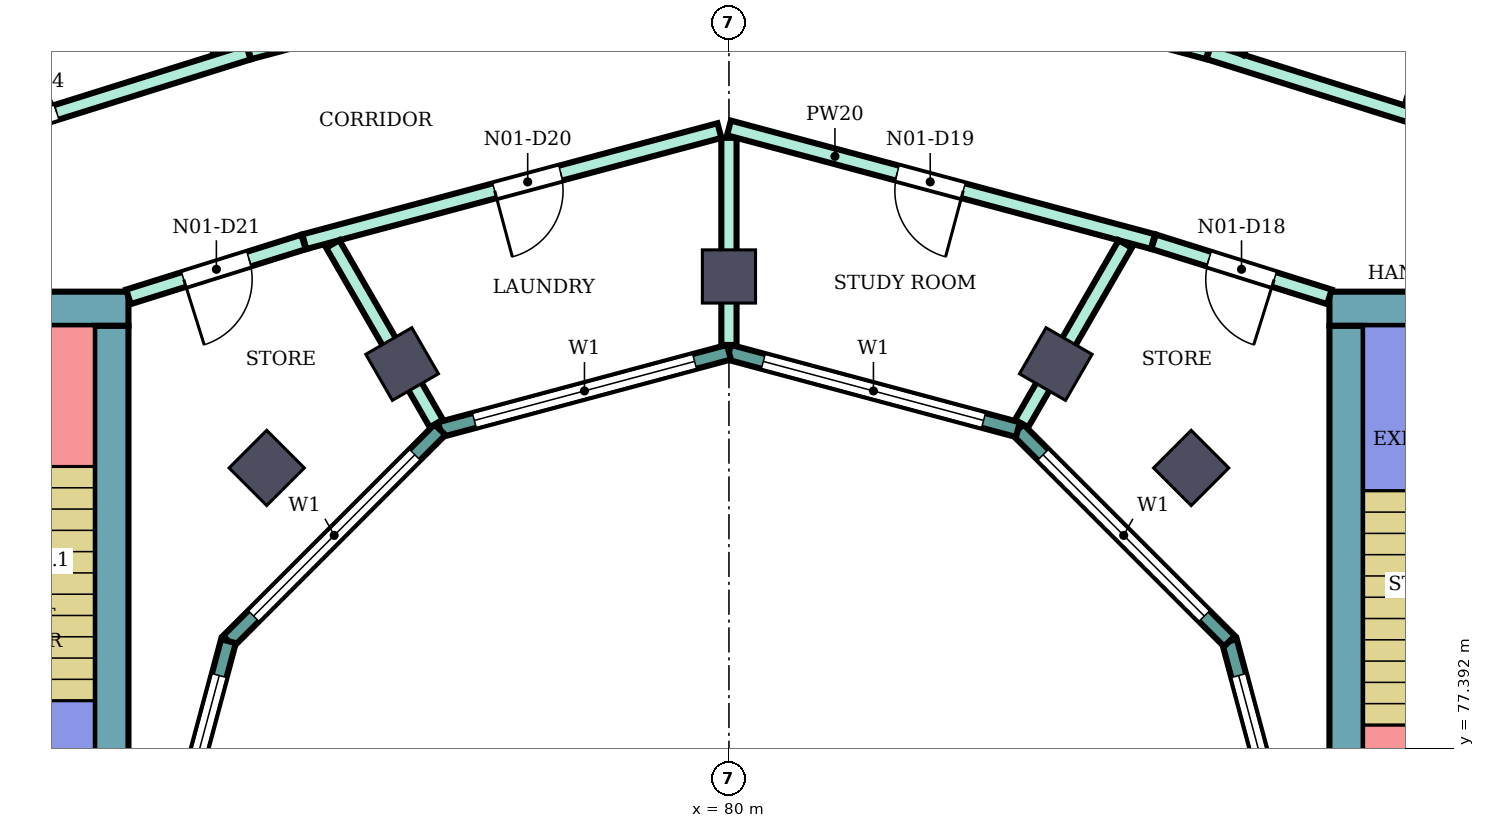
"""IFC4 building model, lengths in metres.
Left out: names, types, materials, properties, quantities, classifications, styles, units other than length and angle.
Written with IfcOpenShell. Run it as: python <this file> out.ifc"""

import sys

from ifc_helpers import new_model, si_unit, direction, frame, frame_2d, origin, origin_2d, place, context, subcontext, project, spatial, rectangle, extrude, element, fill, save


model = new_model("IFC4")
c1 = context("Model", 3, precision=1e-05, world=origin(), true_north=direction((0.0, 1.0)))
c2 = subcontext(c1, "Body", "Model", "MODEL_VIEW")
j1 = project(units=[si_unit("LENGTHUNIT", "METRE"), si_unit("PLANEANGLEUNIT", "RADIAN")], contexts=[c1])
p1 = place(None, origin())
s1 = spatial("IfcSite", under=j1, at=p1, CompositionType="ELEMENT")
p2 = place(p1, origin())
s2 = spatial("IfcBuilding", under=s1, at=p2, CompositionType="ELEMENT")
p3 = place(p2, frame((0.0, 0.0, 275.7)))
s3 = spatial("IfcBuildingStorey", under=s2, at=p3, CompositionType="ELEMENT", Elevation=275.7)
for number, where, z_axis, x_axis in (
    (1, (86.081, 81.081, 0.0), (0.0, 0.0, 1.0), (0.707, 0.707, 0.0)),
    (2, (84.3, 82.448, 0.0), (0.0, 0.0, 1.0), (0.5, 0.866, 0.0)),
    (3, (80.0, 83.6, 0.0), (0.0, 0.0, 1.0), (0.0, 1.0, 0.0)),
    (4, (75.7, 82.448, 0.0), (0.0, 0.0, 1.0), (-0.5, 0.866, 0.0)),
    (5, (73.919, 81.081, 0.0), (0.0, 0.0, 1.0), (-0.707, 0.707, 0.0)),
):
    element("IfcColumn", number, at=place(p3, frame(where, z_axis=z_axis, x_axis=x_axis)), inside=s3, PredefinedType="COLUMN", context=c2, shape_type="SweptSolid", body=[
        extrude(rectangle(XDim=0.7, YDim=0.7, at=origin_2d()), origin(), (0.0, 0.0, 1.0), 4.2),
    ])
p4 = place(p3, frame((87.9, 83.175, 0.0), z_axis=(0.0, 0.0, 1.0), x_axis=(1.0, 0.0, 0.0)))
e6 = element("IfcWall", 6, at=p4, inside=s3, PredefinedType="SHEAR", context=c2, shape_type="SweptSolid", body=[
    extrude(rectangle(XDim=13.55, YDim=0.45, at=frame_2d((6.775, 0.0))), origin(), (0.0, 0.0, 1.0), 3.88),
])
p5 = place(p4, frame((4.2, 0.0, 0.0)))
e7 = element("IfcOpeningElement", 7, at=p5, cuts=e6, PredefinedType="OPENING", context=c2, shape_type="SweptSolid", body=[
    extrude(rectangle(XDim=2.4, YDim=2.4, at=frame_2d((1.2, 1.2))), frame((0.0, 0.235, 0.0), z_axis=(0.0, -1.0, 0.0), x_axis=(1.0, 0.0, 0.0)), (0.0, 0.0, 1.0), 0.47),
])
p6 = place(p3, frame((88.125, 75.0, 0.0), z_axis=(0.0, 0.0, 1.0), x_axis=(0.0, 1.0, 0.0)))
e8 = element("IfcWall", 8, at=p6, inside=s3, PredefinedType="SHEAR", context=c2, shape_type="SweptSolid", body=[
    extrude(rectangle(XDim=7.95, YDim=0.45, at=frame_2d((3.975, 0.0))), origin(), (0.0, 0.0, 1.0), 3.88),
])
p7 = place(p3, frame((72.1, 83.175, 0.0), z_axis=(0.0, 0.0, 1.0), x_axis=(-1.0, 0.0, 0.0)))
e9 = element("IfcWall", 9, at=p7, inside=s3, PredefinedType="SHEAR", context=c2, shape_type="SweptSolid", body=[
    extrude(rectangle(XDim=13.55, YDim=0.45, at=frame_2d((6.775, 0.0))), origin(), (0.0, 0.0, 1.0), 3.88),
])
p8 = place(p7, frame((4.2, 0.0, 0.0)))
e10 = element("IfcOpeningElement", 10, at=p8, cuts=e9, PredefinedType="OPENING", context=c2, shape_type="SweptSolid", body=[
    extrude(rectangle(XDim=2.4, YDim=2.4, at=frame_2d((1.2, 1.2))), frame((0.0, 0.235, 0.0), z_axis=(0.0, -1.0, 0.0), x_axis=(1.0, 0.0, 0.0)), (0.0, 0.0, 1.0), 0.47),
])
p9 = place(p3, frame((71.875, 82.95, 0.0), z_axis=(0.0, 0.0, 1.0), x_axis=(0.0, -1.0, 0.0)))
e11 = element("IfcWall", 11, at=p9, inside=s3, PredefinedType="SHEAR", context=c2, shape_type="SweptSolid", body=[
    extrude(rectangle(XDim=7.95, YDim=0.45, at=frame_2d((3.975, 0.0))), origin(), (0.0, 0.0, 1.0), 3.88),
])
p10 = place(p3, frame((87.604, 75.0, 0.0), z_axis=(0.0, 0.0, 1.0), x_axis=(-0.258789828301, 0.965933654434, 0.0)))
e12 = element("IfcWall", 12, at=p10, inside=s3, PredefinedType="NOTDEFINED", context=c2, shape_type="SweptSolid", body=[
    extrude(rectangle(XDim=3.936, YDim=0.2, at=frame_2d((1.968, 0.0))), origin(), (0.0, 0.0, 1.0), 4.2),
])
p11 = place(p10, frame((0.468, 0.0, 0.9)))
e13 = element("IfcOpeningElement", 13, at=p11, cuts=e12, PredefinedType="OPENING", context=c2, shape_type="SweptSolid", body=[
    extrude(rectangle(XDim=3.0, YDim=2.3, at=frame_2d((1.5, 1.15))), frame((0.0, 0.11, 0.0), z_axis=(0.0, -1.0, 0.0), x_axis=(1.0, 0.0, 0.0)), (0.0, 0.0, 1.0), 0.22),
])
p12 = place(p3, frame((86.585, 78.802, 0.0), z_axis=(0.0, 0.0, 1.0), x_axis=(-0.707106781187, 0.707106781187, 0.0)))
e14 = element("IfcWall", 14, at=p12, inside=s3, PredefinedType="NOTDEFINED", context=c2, shape_type="SweptSolid", body=[
    extrude(rectangle(XDim=3.936, YDim=0.2, at=frame_2d((1.968, 0.0))), origin(), (0.0, 0.0, 1.0), 4.2),
])
p13 = place(p12, frame((0.468, 0.0, 0.9)))
e15 = element("IfcOpeningElement", 15, at=p13, cuts=e14, PredefinedType="OPENING", context=c2, shape_type="SweptSolid", body=[
    extrude(rectangle(XDim=3.0, YDim=2.3, at=frame_2d((1.5, 1.15))), frame((0.0, 0.11, 0.0), z_axis=(0.0, -1.0, 0.0), x_axis=(1.0, 0.0, 0.0)), (0.0, 0.0, 1.0), 0.22),
])
p14 = place(p3, frame((83.802, 81.585, 0.0), z_axis=(0.0, 0.0, 1.0), x_axis=(-0.965933654434, 0.258789828301, 0.0)))
e16 = element("IfcWall", 16, at=p14, inside=s3, PredefinedType="NOTDEFINED", context=c2, shape_type="SweptSolid", body=[
    extrude(rectangle(XDim=3.936, YDim=0.2, at=frame_2d((1.968, 0.0))), origin(), (0.0, 0.0, 1.0), 4.2),
])
p15 = place(p14, frame((0.468, 0.0, 0.9)))
e17 = element("IfcOpeningElement", 17, at=p15, cuts=e16, PredefinedType="OPENING", context=c2, shape_type="SweptSolid", body=[
    extrude(rectangle(XDim=3.0, YDim=2.3, at=frame_2d((1.5, 1.15))), frame((0.0, 0.11, 0.0), z_axis=(0.0, -1.0, 0.0), x_axis=(1.0, 0.0, 0.0)), (0.0, 0.0, 1.0), 0.22),
])
p16 = place(p3, frame((80.0, 82.604, 0.0), z_axis=(0.0, 0.0, 1.0), x_axis=(-0.965933654434, -0.258789828301, 0.0)))
e18 = element("IfcWall", 18, at=p16, inside=s3, PredefinedType="NOTDEFINED", context=c2, shape_type="SweptSolid", body=[
    extrude(rectangle(XDim=3.936, YDim=0.2, at=frame_2d((1.968, 0.0))), origin(), (0.0, 0.0, 1.0), 4.2),
])
p17 = place(p16, frame((0.468, 0.0, 0.9)))
e19 = element("IfcOpeningElement", 19, at=p17, cuts=e18, PredefinedType="OPENING", context=c2, shape_type="SweptSolid", body=[
    extrude(rectangle(XDim=3.0, YDim=2.3, at=frame_2d((1.5, 1.15))), frame((0.0, 0.11, 0.0), z_axis=(0.0, -1.0, 0.0), x_axis=(1.0, 0.0, 0.0)), (0.0, 0.0, 1.0), 0.22),
])
p18 = place(p3, frame((76.198, 81.585, 0.0), z_axis=(0.0, 0.0, 1.0), x_axis=(-0.707106781187, -0.707106781187, 0.0)))
e20 = element("IfcWall", 20, at=p18, inside=s3, PredefinedType="NOTDEFINED", context=c2, shape_type="SweptSolid", body=[
    extrude(rectangle(XDim=3.936, YDim=0.2, at=frame_2d((1.968, 0.0))), origin(), (0.0, 0.0, 1.0), 4.2),
])
p19 = place(p18, frame((0.468, 0.0, 0.9)))
e21 = element("IfcOpeningElement", 21, at=p19, cuts=e20, PredefinedType="OPENING", context=c2, shape_type="SweptSolid", body=[
    extrude(rectangle(XDim=3.0, YDim=2.3, at=frame_2d((1.5, 1.15))), frame((0.0, 0.11, 0.0), z_axis=(0.0, -1.0, 0.0), x_axis=(1.0, 0.0, 0.0)), (0.0, 0.0, 1.0), 0.22),
])
p20 = place(p3, frame((73.415, 78.802, 0.0), z_axis=(0.0, 0.0, 1.0), x_axis=(-0.258789828301, -0.965933654434, 0.0)))
e22 = element("IfcWall", 22, at=p20, inside=s3, PredefinedType="NOTDEFINED", context=c2, shape_type="SweptSolid", body=[
    extrude(rectangle(XDim=3.936, YDim=0.2, at=frame_2d((1.968, 0.0))), origin(), (0.0, 0.0, 1.0), 4.2),
])
p21 = place(p20, frame((0.468, 0.0, 0.9)))
e23 = element("IfcOpeningElement", 23, at=p21, cuts=e22, PredefinedType="OPENING", context=c2, shape_type="SweptSolid", body=[
    extrude(rectangle(XDim=3.0, YDim=2.3, at=frame_2d((1.5, 1.15))), frame((0.0, 0.11, 0.0), z_axis=(0.0, -1.0, 0.0), x_axis=(1.0, 0.0, 0.0)), (0.0, 0.0, 1.0), 0.22),
])
p22 = place(p3, frame((67.852, 96.042, 0.0), z_axis=(0.0, 0.0, 1.0), x_axis=(0.499960582802, -0.866048160118, 0.0)))
e24 = element("IfcWall", 24, at=p22, inside=s3, PredefinedType="PARTITIONING", context=c2, shape_type="SweptSolid", body=[
    extrude(rectangle(XDim=10.946, YDim=0.2, at=frame_2d((5.473, 0.0))), origin(), (0.0, 0.0, 1.0), 3.75),
])
p23 = place(p3, frame((68.2, 84.833, 0.0), z_axis=(0.0, 0.0, 1.0), x_axis=(0.954191968402, 0.299195065863, 0.0)))
e25 = element("IfcWall", 25, at=p23, inside=s3, PredefinedType="PARTITIONING", context=c2, shape_type="SweptSolid", body=[
    extrude(rectangle(XDim=5.74, YDim=0.2, at=frame_2d((2.87, 0.0))), origin(), (0.0, 0.0, 1.0), 3.75),
])
p24 = place(p23, frame((2.097, 0.0, 0.0)))
e26 = element("IfcOpeningElement", 26, at=p24, cuts=e25, PredefinedType="OPENING", context=c2, shape_type="SweptSolid", body=[
    extrude(rectangle(XDim=1.0, YDim=2.1, at=frame_2d((0.5, 1.05))), frame((0.0, 0.11, 0.0), z_axis=(0.0, -1.0, 0.0), x_axis=(1.0, 0.0, 0.0)), (0.0, 0.0, 1.0), 0.22),
])
p25 = place(p3, frame((72.1, 83.332, 0.0), z_axis=(0.0, 0.0, 1.0), x_axis=(0.954233106619, 0.299063836383, 0.0)))
e27 = element("IfcWall", 27, at=p25, inside=s3, PredefinedType="PARTITIONING", context=c2, shape_type="SweptSolid", body=[
    extrude(rectangle(XDim=2.414, YDim=0.2, at=frame_2d((1.207, 0.0))), origin(), (0.0, 0.0, 1.0), 3.75),
])
p26 = place(p25, frame((0.762, 0.0, 0.0)))
e28 = element("IfcOpeningElement", 28, at=p26, cuts=e27, PredefinedType="OPENING", context=c2, shape_type="SweptSolid", body=[
    extrude(rectangle(XDim=0.9, YDim=2.1, at=frame_2d((0.45, 1.05))), frame((0.0, 0.11, 0.0), z_axis=(0.0, -1.0, 0.0), x_axis=(1.0, 0.0, 0.0)), (0.0, 0.0, 1.0), 0.22),
])
p27 = place(p3, frame((73.687, 86.554, 0.0), z_axis=(0.0, 0.0, 1.0), x_axis=(0.966002126521, 0.258534120682, 0.0)))
e29 = element("IfcWall", 29, at=p27, inside=s3, PredefinedType="PARTITIONING", context=c2, shape_type="SweptSolid", body=[
    extrude(rectangle(XDim=6.486, YDim=0.2, at=frame_2d((3.243, 0.0))), origin(), (0.0, 0.0, 1.0), 3.75),
])
p28 = place(p3, frame((74.413, 84.057, 0.0), z_axis=(0.0, 0.0, 1.0), x_axis=(0.965972135939, 0.258646153246, 0.0)))
e30 = element("IfcWall", 30, at=p28, inside=s3, PredefinedType="PARTITIONING", context=c2, shape_type="SweptSolid", body=[
    extrude(rectangle(XDim=5.654, YDim=0.2, at=frame_2d((2.827, 0.0))), origin(), (0.0, 0.0, 1.0), 3.75),
])
p29 = place(p28, frame((2.593, 0.0, 0.0)))
e31 = element("IfcOpeningElement", 31, at=p29, cuts=e30, PredefinedType="OPENING", context=c2, shape_type="SweptSolid", body=[
    extrude(rectangle(XDim=0.9, YDim=2.1, at=frame_2d((0.45, 1.05))), frame((0.0, 0.11, 0.0), z_axis=(0.0, -1.0, 0.0), x_axis=(1.0, 0.0, 0.0)), (0.0, 0.0, 1.0), 0.22),
])
p30 = place(p3, frame((74.788, 84.027, 0.0), z_axis=(0.0, 0.0, 1.0), x_axis=(0.49997314572, -0.866040907555, 0.0)))
e32 = element("IfcWall", 32, at=p30, inside=s3, PredefinedType="PARTITIONING", context=c2, shape_type="SweptSolid", body=[
    extrude(rectangle(XDim=2.726, YDim=0.2, at=frame_2d((1.363, 0.0))), origin(), (0.0, 0.0, 1.0), 3.75),
])
p31 = place(p3, frame((80.0, 82.699, 0.0), z_axis=(0.0, 0.0, 1.0), x_axis=(0.0, 1.0, 0.0)))
e33 = element("IfcWall", 33, at=p31, inside=s3, PredefinedType="PARTITIONING", context=c2, shape_type="SweptSolid", body=[
    extrude(rectangle(XDim=2.725, YDim=0.2, at=frame_2d((1.363, 0.0))), origin(), (0.0, 0.0, 1.0), 3.75),
])
p32 = place(p3, frame((80.0, 85.554, 0.0), z_axis=(0.0, 0.0, 1.0), x_axis=(0.965928989968, -0.258807237802, 0.0)))
e34 = element("IfcWall", 34, at=p32, inside=s3, PredefinedType="PARTITIONING", context=c2, shape_type="SweptSolid", body=[
    extrude(rectangle(XDim=5.774, YDim=0.2, at=frame_2d((2.887, 0.0))), origin(), (0.0, 0.0, 1.0), 3.75),
])
p33 = place(p32, frame((2.292, 0.0, 0.0)))
e35 = element("IfcOpeningElement", 35, at=p33, cuts=e34, PredefinedType="OPENING", context=c2, shape_type="SweptSolid", body=[
    extrude(rectangle(XDim=0.9, YDim=2.1, at=frame_2d((0.45, 1.05))), frame((0.0, 0.11, 0.0), z_axis=(0.0, -1.0, 0.0), x_axis=(1.0, 0.0, 0.0)), (0.0, 0.0, 1.0), 0.22),
])
p34 = place(p3, frame((80.048, 88.233, 0.0), z_axis=(0.0, 0.0, 1.0), x_axis=(0.965865387308, -0.259044501198, 0.0)))
e36 = element("IfcWall", 36, at=p34, inside=s3, PredefinedType="PARTITIONING", context=c2, shape_type="SweptSolid", body=[
    extrude(rectangle(XDim=6.476, YDim=0.2, at=frame_2d((3.238, 0.0))), origin(), (0.0, 0.0, 1.0), 3.75),
])
p35 = place(p34, frame((4.936, 0.0, 0.0)))
e37 = element("IfcOpeningElement", 37, at=p35, cuts=e36, PredefinedType="OPENING", context=c2, shape_type="SweptSolid", body=[
    extrude(rectangle(XDim=1.0, YDim=2.1, at=frame_2d((0.5, 1.05))), frame((0.0, 0.11, 0.0), z_axis=(0.0, -1.0, 0.0), x_axis=(1.0, 0.0, 0.0)), (0.0, 0.0, 1.0), 0.22),
])
p36 = place(p3, frame((83.85, 81.666, 0.0), z_axis=(0.0, 0.0, 1.0), x_axis=(0.500146274735, 0.865940935554, 0.0)))
e38 = element("IfcWall", 38, at=p36, inside=s3, PredefinedType="PARTITIONING", context=c2, shape_type="SweptSolid", body=[
    extrude(rectangle(XDim=2.726, YDim=0.2, at=frame_2d((1.363, 0.0))), origin(), (0.0, 0.0, 1.0), 3.75),
])
p37 = place(p3, frame((85.587, 84.057, 0.0), z_axis=(0.0, 0.0, 1.0), x_axis=(0.954239513179, -0.299043393987, 0.0)))
e39 = element("IfcWall", 39, at=p37, inside=s3, PredefinedType="PARTITIONING", context=c2, shape_type="SweptSolid", body=[
    extrude(rectangle(XDim=2.424, YDim=0.2, at=frame_2d((1.212, 0.0))), origin(), (0.0, 0.0, 1.0), 3.75),
])
p38 = place(p37, frame((0.762, 0.0, 0.0)))
e40 = element("IfcOpeningElement", 40, at=p38, cuts=e39, PredefinedType="OPENING", context=c2, shape_type="SweptSolid", body=[
    extrude(rectangle(XDim=0.9, YDim=2.1, at=frame_2d((0.45, 1.05))), frame((0.0, 0.11, 0.0), z_axis=(0.0, -1.0, 0.0), x_axis=(1.0, 0.0, 0.0)), (0.0, 0.0, 1.0), 0.22),
])
p39 = place(p3, frame((86.313, 86.554, 0.0), z_axis=(0.0, 0.0, 1.0), x_axis=(0.954089584911, -0.299521391497, 0.0)))
e41 = element("IfcWall", 41, at=p39, inside=s3, PredefinedType="PARTITIONING", context=c2, shape_type="SweptSolid", body=[
    extrude(rectangle(XDim=5.72, YDim=0.2, at=frame_2d((2.86, 0.0))), origin(), (0.0, 0.0, 1.0), 3.75),
])
p40 = place(p3, frame((86.678, 86.562, 0.0), z_axis=(0.0, 0.0, 1.0), x_axis=(0.500133037155, 0.865948581122, 0.0)))
e42 = element("IfcWall", 42, at=p40, inside=s3, PredefinedType="PARTITIONING", context=c2, shape_type="SweptSolid", body=[
    extrude(rectangle(XDim=10.946, YDim=0.2, at=frame_2d((5.473, 0.0))), origin(), (0.0, 0.0, 1.0), 3.75),
])
p41 = place(p3, frame((88.936, 85.836, 0.0), z_axis=(0.0, 0.0, 1.0), x_axis=(0.299371771011, 0.954136543018, 0.0)))
e43 = element("IfcWall", 43, at=p41, inside=s3, PredefinedType="PARTITIONING", context=c2, shape_type="SweptSolid", body=[
    extrude(rectangle(XDim=2.75, YDim=0.1, at=frame_2d((1.375, 0.0))), origin(), (0.0, 0.0, 1.0), 3.75),
])
p42 = place(p11, origin())
e44 = element("IfcWindow", 44, at=p42, inside=s3, PartitioningType="SINGLE_PANEL", PredefinedType="WINDOW", context=c2, shape_type="SweptSolid", body=[
    extrude(rectangle(XDim=3.0, YDim=2.3, at=frame_2d((1.5, 1.15))), frame((0.0, 0.03, 0.0), z_axis=(0.0, -1.0, 0.0), x_axis=(1.0, 0.0, 0.0)), (0.0, 0.0, 1.0), 0.06),
])
fill(e13, e44)
p43 = place(p13, origin())
e45 = element("IfcWindow", 45, at=p43, inside=s3, PartitioningType="SINGLE_PANEL", PredefinedType="WINDOW", context=c2, shape_type="SweptSolid", body=[
    extrude(rectangle(XDim=3.0, YDim=2.3, at=frame_2d((1.5, 1.15))), frame((0.0, 0.03, 0.0), z_axis=(0.0, -1.0, 0.0), x_axis=(1.0, 0.0, 0.0)), (0.0, 0.0, 1.0), 0.06),
])
fill(e15, e45)
p44 = place(p15, origin())
e46 = element("IfcWindow", 46, at=p44, inside=s3, PartitioningType="SINGLE_PANEL", PredefinedType="WINDOW", context=c2, shape_type="SweptSolid", body=[
    extrude(rectangle(XDim=3.0, YDim=2.3, at=frame_2d((1.5, 1.15))), frame((0.0, 0.03, 0.0), z_axis=(0.0, -1.0, 0.0), x_axis=(1.0, 0.0, 0.0)), (0.0, 0.0, 1.0), 0.06),
])
fill(e17, e46)
p45 = place(p17, origin())
e47 = element("IfcWindow", 47, at=p45, inside=s3, PartitioningType="SINGLE_PANEL", PredefinedType="WINDOW", context=c2, shape_type="SweptSolid", body=[
    extrude(rectangle(XDim=3.0, YDim=2.3, at=frame_2d((1.5, 1.15))), frame((0.0, 0.03, 0.0), z_axis=(0.0, -1.0, 0.0), x_axis=(1.0, 0.0, 0.0)), (0.0, 0.0, 1.0), 0.06),
])
fill(e19, e47)
p46 = place(p19, origin())
e48 = element("IfcWindow", 48, at=p46, inside=s3, PartitioningType="SINGLE_PANEL", PredefinedType="WINDOW", context=c2, shape_type="SweptSolid", body=[
    extrude(rectangle(XDim=3.0, YDim=2.3, at=frame_2d((1.5, 1.15))), frame((0.0, 0.03, 0.0), z_axis=(0.0, -1.0, 0.0), x_axis=(1.0, 0.0, 0.0)), (0.0, 0.0, 1.0), 0.06),
])
fill(e21, e48)
p47 = place(p21, origin())
e49 = element("IfcWindow", 49, at=p47, inside=s3, PartitioningType="SINGLE_PANEL", PredefinedType="WINDOW", context=c2, shape_type="SweptSolid", body=[
    extrude(rectangle(XDim=3.0, YDim=2.3, at=frame_2d((1.5, 1.15))), frame((0.0, 0.03, 0.0), z_axis=(0.0, -1.0, 0.0), x_axis=(1.0, 0.0, 0.0)), (0.0, 0.0, 1.0), 0.06),
])
fill(e23, e49)
p48 = place(p24, origin())
e50 = element("IfcDoor", 50, at=p48, inside=s3, OperationType="SINGLE_SWING_LEFT", PredefinedType="DOOR", context=c2, shape_type="SweptSolid", body=[
    extrude(rectangle(XDim=1.0, YDim=2.1, at=frame_2d((0.5, 1.05))), frame((0.0, 0.025, 0.0), z_axis=(0.0, -1.0, 0.0), x_axis=(1.0, 0.0, 0.0)), (0.0, 0.0, 1.0), 0.05),
])
fill(e26, e50)
p49 = place(p38, frame((0.9, 0.0, 0.0), z_axis=(0.0, 0.0, 1.0), x_axis=(-1.0, 0.0, 0.0)))
e51 = element("IfcDoor", 51, at=p49, inside=s3, OperationType="SINGLE_SWING_LEFT", PredefinedType="DOOR", context=c2, shape_type="SweptSolid", body=[
    extrude(rectangle(XDim=0.9, YDim=2.1, at=frame_2d((0.45, 1.05))), frame((0.0, 0.025, 0.0), z_axis=(0.0, -1.0, 0.0), x_axis=(1.0, 0.0, 0.0)), (0.0, 0.0, 1.0), 0.05),
])
fill(e40, e51)
p50 = place(p33, frame((0.9, 0.0, 0.0), z_axis=(0.0, 0.0, 1.0), x_axis=(-1.0, 0.0, 0.0)))
e52 = element("IfcDoor", 52, at=p50, inside=s3, OperationType="SINGLE_SWING_LEFT", PredefinedType="DOOR", context=c2, shape_type="SweptSolid", body=[
    extrude(rectangle(XDim=0.9, YDim=2.1, at=frame_2d((0.45, 1.05))), frame((0.0, 0.025, 0.0), z_axis=(0.0, -1.0, 0.0), x_axis=(1.0, 0.0, 0.0)), (0.0, 0.0, 1.0), 0.05),
])
fill(e35, e52)
p51 = place(p29, frame((0.9, 0.0, 0.0), z_axis=(0.0, 0.0, 1.0), x_axis=(-1.0, 0.0, 0.0)))
e53 = element("IfcDoor", 53, at=p51, inside=s3, OperationType="SINGLE_SWING_RIGHT", PredefinedType="DOOR", context=c2, shape_type="SweptSolid", body=[
    extrude(rectangle(XDim=0.9, YDim=2.1, at=frame_2d((0.45, 1.05))), frame((0.0, 0.025, 0.0), z_axis=(0.0, -1.0, 0.0), x_axis=(1.0, 0.0, 0.0)), (0.0, 0.0, 1.0), 0.05),
])
fill(e31, e53)
p52 = place(p26, frame((0.9, 0.0, 0.0), z_axis=(0.0, 0.0, 1.0), x_axis=(-1.0, 0.0, 0.0)))
e54 = element("IfcDoor", 54, at=p52, inside=s3, OperationType="SINGLE_SWING_RIGHT", PredefinedType="DOOR", context=c2, shape_type="SweptSolid", body=[
    extrude(rectangle(XDim=0.9, YDim=2.1, at=frame_2d((0.45, 1.05))), frame((0.0, 0.025, 0.0), z_axis=(0.0, -1.0, 0.0), x_axis=(1.0, 0.0, 0.0)), (0.0, 0.0, 1.0), 0.05),
])
fill(e28, e54)
save(model, sys.argv[1])
